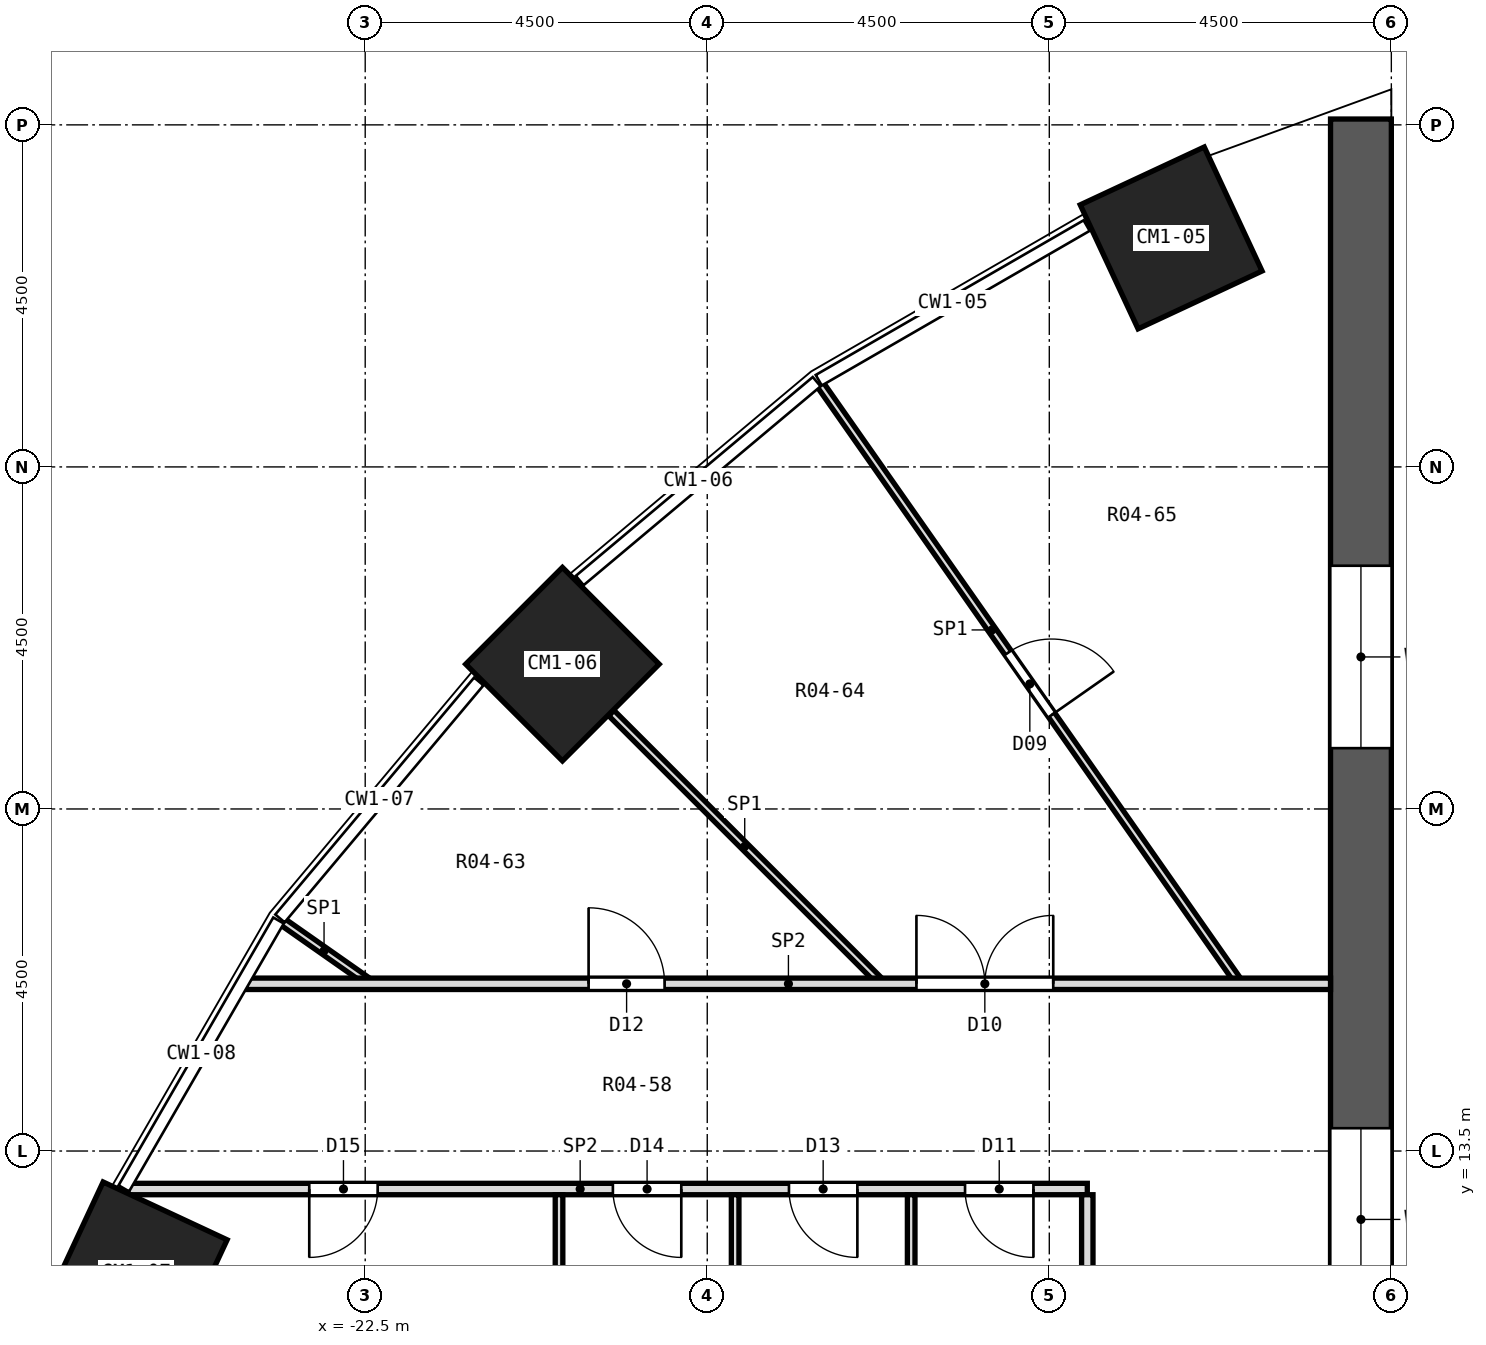
"""IFC4 building model, lengths in metres.
Left out: names, types, materials, properties, quantities, classifications, styles, units other than length and angle.
Written with IfcOpenShell. Run it as: python <this file> out.ifc"""

import sys

from ifc_helpers import new_model, si_unit, direction, frame, frame_2d, origin, origin_2d, place, context, subcontext, project, spatial, polyline, rectangle, outline, extrude, element, fill, save


model = new_model("IFC4")
c1 = context("Model", 3, precision=1e-05, world=origin(), true_north=direction((0.0, 1.0)))
c2 = subcontext(c1, "Body", "Model", "MODEL_VIEW")
j1 = project(units=[si_unit("LENGTHUNIT", "METRE"), si_unit("PLANEANGLEUNIT", "RADIAN")], contexts=[c1])
p1 = place(None, origin())
s1 = spatial("IfcSite", under=j1, at=p1, CompositionType="ELEMENT")
p2 = place(p1, origin())
s2 = spatial("IfcBuilding", under=s1, at=p2, CompositionType="ELEMENT")
p3 = place(p2, frame((0.0, 0.0, 5.0)))
s3 = spatial("IfcBuildingStorey", under=s2, at=p3, CompositionType="ELEMENT", Elevation=5.0)
for number, where, z_axis, x_axis in (
    (1, (-11.897, 25.512, 0.0), (0.0, 0.0, 1.0), (-0.423, 0.906, 0.0)),
    (2, (-19.905, 19.905, 0.0), (0.0, 0.0, 1.0), (-0.707, 0.707, 0.0)),
    (3, (-25.512, 11.897, 0.0), (0.0, 0.0, 1.0), (-0.906, 0.423, 0.0)),
):
    element("IfcColumn", number, at=place(p3, frame(where, z_axis=z_axis, x_axis=x_axis)), inside=s3, PredefinedType="COLUMN", context=c2, shape_type="SweptSolid", body=[
        extrude(rectangle(XDim=1.8, YDim=1.8, at=origin_2d()), origin(), (0.0, 0.0, 1.0), 4.2),
    ])
p4 = place(p3, frame((-9.4, -27.077, 0.0), z_axis=(0.0, 0.0, 1.0), x_axis=(0.0, 1.0, 0.0)))
e4 = element("IfcWall", 4, at=p4, inside=s3, PredefinedType="SHEAR", context=c2, shape_type="SweptSolid", body=[
    extrude(rectangle(XDim=54.154, YDim=0.8, at=frame_2d((27.077, 0.0))), origin(), (0.0, 0.0, 1.0), 4.2),
])
p5 = place(p4, frame((13.277, 0.0, 0.9)))
e5 = element("IfcOpeningElement", 5, at=p5, cuts=e4, PredefinedType="OPENING", context=c2, shape_type="SweptSolid", body=[
    extrude(rectangle(XDim=2.4, YDim=2.1, at=frame_2d((1.2, 1.05))), frame((0.0, 0.412, 0.0), z_axis=(0.0, -1.0, 0.0), x_axis=(1.0, 0.0, 0.0)), (0.0, 0.0, 1.0), 0.824),
])
p6 = place(p4, frame((17.877, 0.0, 0.9)))
e6 = element("IfcOpeningElement", 6, at=p6, cuts=e4, PredefinedType="OPENING", context=c2, shape_type="SweptSolid", body=[
    extrude(rectangle(XDim=2.4, YDim=2.1, at=frame_2d((1.2, 1.05))), frame((0.0, 0.412, 0.0), z_axis=(0.0, -1.0, 0.0), x_axis=(1.0, 0.0, 0.0)), (0.0, 0.0, 1.0), 0.824),
])
p7 = place(p4, frame((22.477, 0.0, 0.9)))
e7 = element("IfcOpeningElement", 7, at=p7, cuts=e4, PredefinedType="OPENING", context=c2, shape_type="SweptSolid", body=[
    extrude(rectangle(XDim=2.4, YDim=2.1, at=frame_2d((1.2, 1.05))), frame((0.0, 0.412, 0.0), z_axis=(0.0, -1.0, 0.0), x_axis=(1.0, 0.0, 0.0)), (0.0, 0.0, 1.0), 0.824),
])
p8 = place(p4, frame((29.277, 0.0, 0.9)))
e8 = element("IfcOpeningElement", 8, at=p8, cuts=e4, PredefinedType="OPENING", context=c2, shape_type="SweptSolid", body=[
    extrude(rectangle(XDim=2.4, YDim=2.1, at=frame_2d((1.2, 1.05))), frame((0.0, 0.412, 0.0), z_axis=(0.0, -1.0, 0.0), x_axis=(1.0, 0.0, 0.0)), (0.0, 0.0, 1.0), 0.824),
])
p9 = place(p4, frame((33.877, 0.0, 0.9)))
e9 = element("IfcOpeningElement", 9, at=p9, cuts=e4, PredefinedType="OPENING", context=c2, shape_type="SweptSolid", body=[
    extrude(rectangle(XDim=2.4, YDim=2.1, at=frame_2d((1.2, 1.05))), frame((0.0, 0.412, 0.0), z_axis=(0.0, -1.0, 0.0), x_axis=(1.0, 0.0, 0.0)), (0.0, 0.0, 1.0), 0.824),
])
p10 = place(p4, frame((38.477, 0.0, 0.9)))
e10 = element("IfcOpeningElement", 10, at=p10, cuts=e4, PredefinedType="OPENING", context=c2, shape_type="SweptSolid", body=[
    extrude(rectangle(XDim=2.4, YDim=2.1, at=frame_2d((1.2, 1.05))), frame((0.0, 0.412, 0.0), z_axis=(0.0, -1.0, 0.0), x_axis=(1.0, 0.0, 0.0)), (0.0, 0.0, 1.0), 0.824),
])
p11 = place(p4, frame((5.877, 0.0, 0.9)))
e11 = element("IfcOpeningElement", 11, at=p11, cuts=e4, PredefinedType="OPENING", context=c2, shape_type="SweptSolid", body=[
    extrude(rectangle(XDim=2.4, YDim=2.1, at=frame_2d((1.2, 1.05))), frame((0.0, 0.412, 0.0), z_axis=(0.0, -1.0, 0.0), x_axis=(1.0, 0.0, 0.0)), (0.0, 0.0, 1.0), 0.824),
])
p12 = place(p4, frame((45.877, 0.0, 0.9)))
e12 = element("IfcOpeningElement", 12, at=p12, cuts=e4, PredefinedType="OPENING", context=c2, shape_type="SweptSolid", body=[
    extrude(rectangle(XDim=2.4, YDim=2.1, at=frame_2d((1.2, 1.05))), frame((0.0, 0.412, 0.0), z_axis=(0.0, -1.0, 0.0), x_axis=(1.0, 0.0, 0.0)), (0.0, 0.0, 1.0), 0.824),
])
p13 = place(p3, frame((-11.637, 26.498, 0.0), z_axis=(-0.341981019293, 0.939704755181, 0.001988852104), x_axis=(0.939706613726, 0.341981695593, 3.2622e-08)))
e13 = element("IfcWall", 13, at=p13, inside=s3, PredefinedType="SOLIDWALL", context=c2, shape_type="SweptSolid", body=[
    extrude(outline(polyline([(0.0, 0.0), (2.81, 0.0), (2.81, -1.0), (2.852, -2.098), (2.977, -3.191), (3.171, -4.2), (2.81, -4.2), (2.81, -3.65), (-4.344e-05, -3.65), (0.0, 0.0)])), origin(), (0.0, 0.0, -1.0), 0.38),
])
p14 = place(p3, frame((-16.519, 23.591, 0.0), z_axis=(0.0, 0.0, 1.0), x_axis=(0.573616613219, -0.819123910675, 0.0)))
e14 = element("IfcWall", 14, at=p14, inside=s3, PredefinedType="PARTITIONING", context=c2, shape_type="SweptSolid", body=[
    extrude(rectangle(XDim=9.559, YDim=0.1, at=frame_2d((4.779, 0.0))), origin(), (0.0, 0.0, 1.0), 3.65),
])
p15 = place(p14, frame((4.317, 0.0, 0.0)))
e15 = element("IfcOpeningElement", 15, at=p15, cuts=e14, PredefinedType="OPENING", context=c2, shape_type="SweptSolid", body=[
    extrude(rectangle(XDim=1.0, YDim=2.1, at=frame_2d((0.5, 1.05))), frame((0.0, 0.062, 0.0), z_axis=(0.0, -1.0, 0.0), x_axis=(1.0, 0.0, 0.0)), (0.0, 0.0, 1.0), 0.124),
])
p16 = place(p3, frame((-19.262, 19.262, 0.0), z_axis=(0.0, 0.0, 1.0), x_axis=(0.707180580359, -0.707032974311, 0.0)))
e16 = element("IfcWall", 16, at=p16, inside=s3, PredefinedType="PARTITIONING", context=c2, shape_type="SweptSolid", body=[
    extrude(rectangle(XDim=4.962, YDim=0.1, at=frame_2d((2.481, 0.0))), origin(), (0.0, 0.0, 1.0), 3.65),
])
p17 = place(p3, frame((-23.591, 16.519, 0.0), z_axis=(0.0, 0.0, 1.0), x_axis=(0.818984054331, -0.57381627613, 0.0)))
e17 = element("IfcWall", 17, at=p17, inside=s3, PredefinedType="PARTITIONING", context=c2, shape_type="SweptSolid", body=[
    extrude(rectangle(XDim=1.342, YDim=0.1, at=frame_2d((0.671, 0.0))), origin(), (0.0, 0.0, 1.0), 3.65),
])
p18 = place(p3, frame((-25.622, 13.0, 0.0), z_axis=(0.0, 0.0, 1.0), x_axis=(1.0, 0.0, 0.0)))
e18 = element("IfcWall", 18, at=p18, inside=s3, PredefinedType="PARTITIONING", context=c2, shape_type="SweptSolid", body=[
    extrude(rectangle(XDim=12.622, YDim=0.15, at=frame_2d((6.311, 0.0))), origin(), (0.0, 0.0, 1.0), 3.65),
])
p19 = place(p18, frame((11.013, 0.0, 0.0)))
e19 = element("IfcOpeningElement", 19, at=p19, cuts=e18, PredefinedType="OPENING", context=c2, shape_type="SweptSolid", body=[
    extrude(rectangle(XDim=0.9, YDim=2.1, at=frame_2d((0.45, 1.05))), frame((0.0, 0.087, 0.0), z_axis=(0.0, -1.0, 0.0), x_axis=(1.0, 0.0, 0.0)), (0.0, 0.0, 1.0), 0.174),
])
p20 = place(p18, frame((8.697, 0.0, 0.0)))
e20 = element("IfcOpeningElement", 20, at=p20, cuts=e18, PredefinedType="OPENING", context=c2, shape_type="SweptSolid", body=[
    extrude(rectangle(XDim=0.9, YDim=2.1, at=frame_2d((0.45, 1.05))), frame((0.0, 0.087, 0.0), z_axis=(0.0, -1.0, 0.0), x_axis=(1.0, 0.0, 0.0)), (0.0, 0.0, 1.0), 0.174),
])
p21 = place(p18, frame((6.381, 0.0, 0.0)))
e21 = element("IfcOpeningElement", 21, at=p21, cuts=e18, PredefinedType="OPENING", context=c2, shape_type="SweptSolid", body=[
    extrude(rectangle(XDim=0.9, YDim=2.1, at=frame_2d((0.45, 1.05))), frame((0.0, 0.087, 0.0), z_axis=(0.0, -1.0, 0.0), x_axis=(1.0, 0.0, 0.0)), (0.0, 0.0, 1.0), 0.174),
])
p22 = place(p18, frame((2.386, 0.0, 0.0)))
e22 = element("IfcOpeningElement", 22, at=p22, cuts=e18, PredefinedType="OPENING", context=c2, shape_type="SweptSolid", body=[
    extrude(rectangle(XDim=0.9, YDim=2.1, at=frame_2d((0.45, 1.05))), frame((0.0, 0.087, 0.0), z_axis=(0.0, -1.0, 0.0), x_axis=(1.0, 0.0, 0.0)), (0.0, 0.0, 1.0), 0.174),
])
p23 = place(p3, frame((-24.064, 15.7, 0.0), z_axis=(0.0, 0.0, 1.0), x_axis=(1.0, 0.0, 0.0)))
e23 = element("IfcWall", 23, at=p23, inside=s3, PredefinedType="PARTITIONING", context=c2, shape_type="SweptSolid", body=[
    extrude(rectangle(XDim=14.264, YDim=0.15, at=frame_2d((7.132, 0.0))), origin(), (0.0, 0.0, 1.0), 3.65),
])
p24 = place(p23, frame((8.816, 0.0, 0.0)))
e24 = element("IfcOpeningElement", 24, at=p24, cuts=e23, PredefinedType="OPENING", context=c2, shape_type="SweptSolid", body=[
    extrude(rectangle(XDim=1.8, YDim=2.1, at=frame_2d((0.9, 1.05))), frame((0.0, 0.087, 0.0), z_axis=(0.0, -1.0, 0.0), x_axis=(1.0, 0.0, 0.0)), (0.0, 0.0, 1.0), 0.174),
])
p25 = place(p23, frame((4.503, 0.0, 0.0)))
e25 = element("IfcOpeningElement", 25, at=p25, cuts=e23, PredefinedType="OPENING", context=c2, shape_type="SweptSolid", body=[
    extrude(rectangle(XDim=1.0, YDim=2.1, at=frame_2d((0.5, 1.05))), frame((0.0, 0.087, 0.0), z_axis=(0.0, -1.0, 0.0), x_axis=(1.0, 0.0, 0.0)), (0.0, 0.0, 1.0), 0.174),
])
p26 = place(p3, frame((-13.0, 9.5, 0.0), z_axis=(0.0, 0.0, 1.0), x_axis=(0.0, 1.0, 0.0)))
e26 = element("IfcWall", 26, at=p26, inside=s3, PredefinedType="PARTITIONING", context=c2, shape_type="SweptSolid", body=[
    extrude(rectangle(XDim=3.425, YDim=0.15, at=frame_2d((1.712, 0.0))), origin(), (0.0, 0.0, 1.0), 3.65),
])
for number, where, z_axis, x_axis in (
    (27, (-15.317, 9.5, 0.0), (0.0, 0.0, 1.0), (0.0, 1.0, 0.0)),
    (28, (-17.633, 9.5, 0.0), (0.0, 0.0, 1.0), (0.0, 1.0, 0.0)),
    (29, (-19.95, 9.5, 0.0), (0.0, 0.0, 1.0), (0.0, 1.0, 0.0)),
):
    element("IfcWall", number, at=place(p3, frame(where, z_axis=z_axis, x_axis=x_axis)), inside=s3, PredefinedType="PARTITIONING", context=c2, shape_type="SweptSolid", body=[
        extrude(rectangle(XDim=3.425, YDim=0.1, at=frame_2d((1.712, 0.0))), origin(), (0.0, 0.0, 1.0), 3.65),
    ])
p27 = place(p15, origin())
e30 = element("IfcDoor", 30, at=p27, inside=s3, OperationType="SINGLE_SWING_RIGHT", PredefinedType="DOOR", context=c2, shape_type="SweptSolid", body=[
    extrude(rectangle(XDim=1.0, YDim=2.1, at=frame_2d((0.5, 1.05))), frame((0.0, 0.025, 0.0), z_axis=(0.0, -1.0, 0.0), x_axis=(1.0, 0.0, 0.0)), (0.0, 0.0, 1.0), 0.05),
])
fill(e15, e30)
p28 = place(p24, origin())
e31 = element("IfcDoor", 31, at=p28, inside=s3, OperationType="DOUBLE_DOOR_SINGLE_SWING", PredefinedType="DOOR", context=c2, shape_type="SweptSolid", body=[
    extrude(rectangle(XDim=1.8, YDim=2.1, at=frame_2d((0.9, 1.05))), frame((0.0, 0.025, 0.0), z_axis=(0.0, -1.0, 0.0), x_axis=(1.0, 0.0, 0.0)), (0.0, 0.0, 1.0), 0.05),
])
fill(e24, e31)
p29 = place(p19, frame((0.9, 0.0, 0.0), z_axis=(0.0, 0.0, 1.0), x_axis=(-1.0, 0.0, 0.0)))
e32 = element("IfcDoor", 32, at=p29, inside=s3, OperationType="SINGLE_SWING_LEFT", PredefinedType="DOOR", context=c2, shape_type="SweptSolid", body=[
    extrude(rectangle(XDim=0.9, YDim=2.1, at=frame_2d((0.45, 1.05))), frame((0.0, 0.025, 0.0), z_axis=(0.0, -1.0, 0.0), x_axis=(1.0, 0.0, 0.0)), (0.0, 0.0, 1.0), 0.05),
])
fill(e19, e32)
p30 = place(p25, origin())
e33 = element("IfcDoor", 33, at=p30, inside=s3, OperationType="SINGLE_SWING_LEFT", PredefinedType="DOOR", context=c2, shape_type="SweptSolid", body=[
    extrude(rectangle(XDim=1.0, YDim=2.1, at=frame_2d((0.5, 1.05))), frame((0.0, 0.025, 0.0), z_axis=(0.0, -1.0, 0.0), x_axis=(1.0, 0.0, 0.0)), (0.0, 0.0, 1.0), 0.05),
])
fill(e25, e33)
p31 = place(p20, frame((0.9, 0.0, 0.0), z_axis=(0.0, 0.0, 1.0), x_axis=(-1.0, 0.0, 0.0)))
e34 = element("IfcDoor", 34, at=p31, inside=s3, OperationType="SINGLE_SWING_LEFT", PredefinedType="DOOR", context=c2, shape_type="SweptSolid", body=[
    extrude(rectangle(XDim=0.9, YDim=2.1, at=frame_2d((0.45, 1.05))), frame((0.0, 0.025, 0.0), z_axis=(0.0, -1.0, 0.0), x_axis=(1.0, 0.0, 0.0)), (0.0, 0.0, 1.0), 0.05),
])
fill(e20, e34)
p32 = place(p21, frame((0.9, 0.0, 0.0), z_axis=(0.0, 0.0, 1.0), x_axis=(-1.0, 0.0, 0.0)))
e35 = element("IfcDoor", 35, at=p32, inside=s3, OperationType="SINGLE_SWING_LEFT", PredefinedType="DOOR", context=c2, shape_type="SweptSolid", body=[
    extrude(rectangle(XDim=0.9, YDim=2.1, at=frame_2d((0.45, 1.05))), frame((0.0, 0.025, 0.0), z_axis=(0.0, -1.0, 0.0), x_axis=(1.0, 0.0, 0.0)), (0.0, 0.0, 1.0), 0.05),
])
fill(e21, e35)
p33 = place(p22, frame((0.9, 0.0, 0.0), z_axis=(0.0, 0.0, 1.0), x_axis=(-1.0, 0.0, 0.0)))
e36 = element("IfcDoor", 36, at=p33, inside=s3, OperationType="SINGLE_SWING_RIGHT", PredefinedType="DOOR", context=c2, shape_type="SweptSolid", body=[
    extrude(rectangle(XDim=0.9, YDim=2.1, at=frame_2d((0.45, 1.05))), frame((0.0, 0.025, 0.0), z_axis=(0.0, -1.0, 0.0), x_axis=(1.0, 0.0, 0.0)), (0.0, 0.0, 1.0), 0.05),
])
fill(e22, e36)
p34 = place(p10, origin())
e37 = element("IfcWindow", 37, at=p34, inside=s3, PartitioningType="SINGLE_PANEL", PredefinedType="WINDOW", context=c2, shape_type="SweptSolid", body=[
    extrude(rectangle(XDim=2.4, YDim=2.1, at=frame_2d((1.2, 1.05))), frame((0.0, 0.03, 0.0), z_axis=(0.0, -1.0, 0.0), x_axis=(1.0, 0.0, 0.0)), (0.0, 0.0, 1.0), 0.06),
])
fill(e10, e37)
p35 = place(p12, origin())
e38 = element("IfcWindow", 38, at=p35, inside=s3, PartitioningType="SINGLE_PANEL", PredefinedType="WINDOW", context=c2, shape_type="SweptSolid", body=[
    extrude(rectangle(XDim=2.4, YDim=2.1, at=frame_2d((1.2, 1.05))), frame((0.0, 0.03, 0.0), z_axis=(0.0, -1.0, 0.0), x_axis=(1.0, 0.0, 0.0)), (0.0, 0.0, 1.0), 0.06),
])
fill(e12, e38)
save(model, sys.argv[1])
